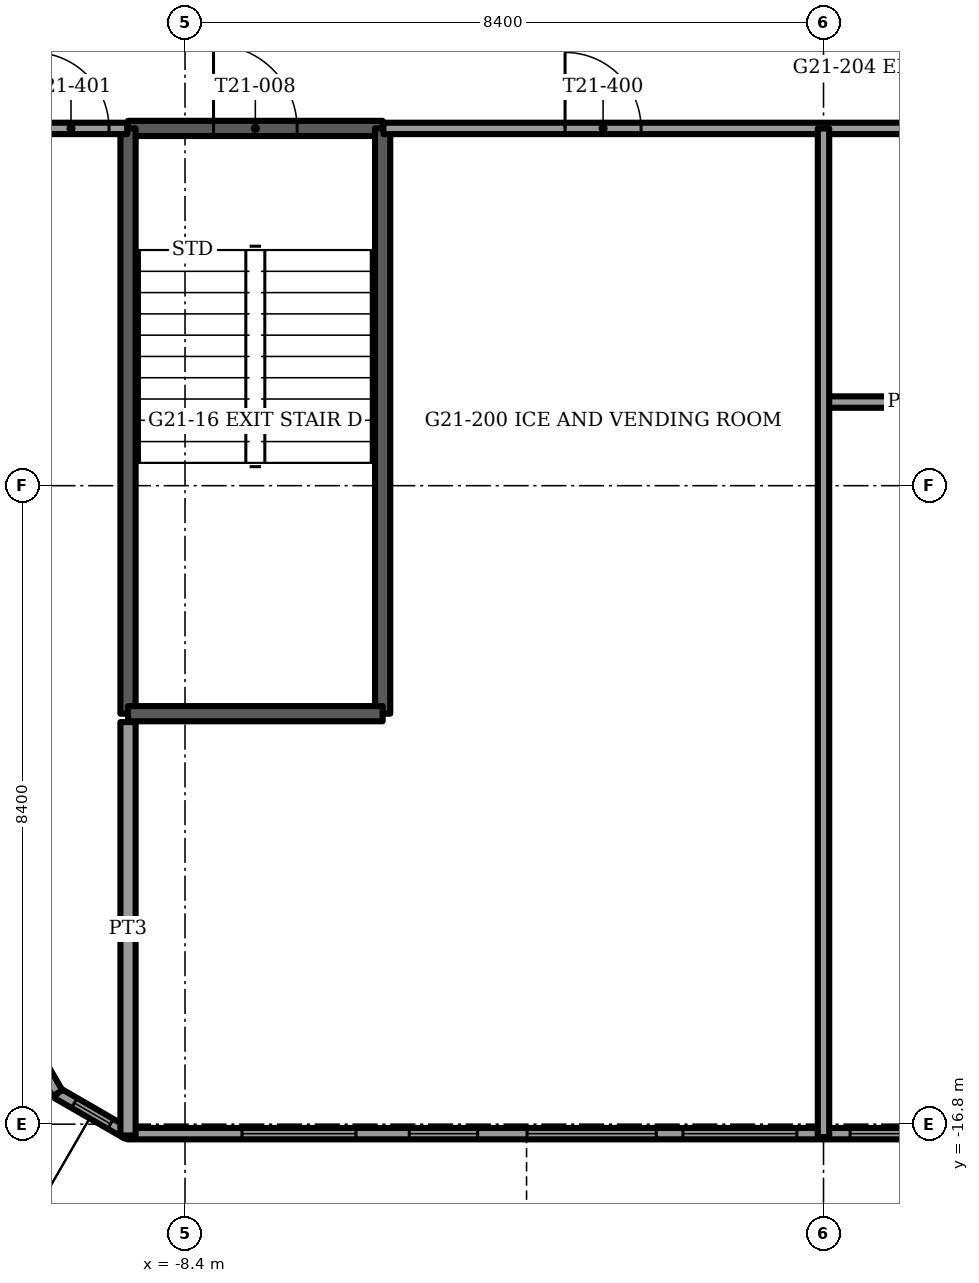
"""IFC4 building model, lengths in metres.
Left out: names, types, materials, properties, quantities, classifications, styles, units other than length and angle.
Written with IfcOpenShell. Run it as: python <this file> out.ifc"""

import sys

from ifc_helpers import new_model, si_unit, direction, frame, frame_2d, origin, place, context, subcontext, project, spatial, rectangle, extrude, element, fill, save


model = new_model("IFC4")
c1 = context("Model", 3, precision=1e-05, world=origin(), true_north=direction((0.0, 1.0)))
c2 = subcontext(c1, "Body", "Model", "MODEL_VIEW")
j1 = project(units=[si_unit("LENGTHUNIT", "METRE"), si_unit("PLANEANGLEUNIT", "RADIAN")], contexts=[c1])
p1 = place(None, origin())
s1 = spatial("IfcSite", under=j1, at=p1, CompositionType="ELEMENT")
p2 = place(p1, origin())
s2 = spatial("IfcBuilding", under=s1, at=p2, CompositionType="ELEMENT")
p3 = place(p2, frame((0.0, 0.0, 85.5)))
s3 = spatial("IfcBuildingStorey", under=s2, at=p3, CompositionType="ELEMENT", Elevation=85.5)
p4 = place(p3, frame((-19.236, -0.532, 0.0), z_axis=(0.0, 0.0, 1.0), x_axis=(0.499995945303, -0.866027744752, 0.0)))
e1 = element("IfcWall", 1, at=p4, inside=s3, PredefinedType="SOLIDWALL", context=c2, shape_type="SweptSolid", body=[
    extrude(rectangle(XDim=18.314, YDim=0.15, at=frame_2d((9.157, 0.0))), origin(), (0.0, 0.0, 1.0), 3.45),
])
p5 = place(p4, frame((4.784, 0.0, 0.15)))
e2 = element("IfcOpeningElement", 2, at=p5, cuts=e1, PredefinedType="OPENING", context=c2, shape_type="SweptSolid", body=[
    extrude(rectangle(XDim=1.5, YDim=2.85, at=frame_2d((0.75, 1.425))), frame((0.0, 0.075, 0.0), z_axis=(0.0, -1.0, 0.0), x_axis=(1.0, 0.0, 0.0)), (0.0, 0.0, 1.0), 0.15),
])
p6 = place(p4, frame((7.357, 0.0, 0.15)))
e3 = element("IfcOpeningElement", 3, at=p6, cuts=e1, PredefinedType="OPENING", context=c2, shape_type="SweptSolid", body=[
    extrude(rectangle(XDim=1.7, YDim=2.85, at=frame_2d((0.85, 1.425))), frame((0.0, 0.075, 0.0), z_axis=(0.0, -1.0, 0.0), x_axis=(1.0, 0.0, 0.0)), (0.0, 0.0, 1.0), 0.15),
])
p7 = place(p4, frame((9.457, 0.0, 0.0)))
e4 = element("IfcOpeningElement", 4, at=p7, cuts=e1, PredefinedType="OPENING", context=c2, shape_type="SweptSolid", body=[
    extrude(rectangle(XDim=1.5, YDim=2.4, at=frame_2d((0.75, 1.2))), frame((0.0, 0.075, 0.0), z_axis=(0.0, -1.0, 0.0), x_axis=(1.0, 0.0, 0.0)), (0.0, 0.0, 1.0), 0.15),
])
p8 = place(p4, frame((11.557, 0.0, 0.15)))
e5 = element("IfcOpeningElement", 5, at=p8, cuts=e1, PredefinedType="OPENING", context=c2, shape_type="SweptSolid", body=[
    extrude(rectangle(XDim=1.7, YDim=2.85, at=frame_2d((0.85, 1.425))), frame((0.0, 0.075, 0.0), z_axis=(0.0, -1.0, 0.0), x_axis=(1.0, 0.0, 0.0)), (0.0, 0.0, 1.0), 0.15),
])
p9 = place(p4, frame((13.657, 0.0, 0.0)))
e6 = element("IfcOpeningElement", 6, at=p9, cuts=e1, PredefinedType="OPENING", context=c2, shape_type="SweptSolid", body=[
    extrude(rectangle(XDim=1.5, YDim=2.4, at=frame_2d((0.75, 1.2))), frame((0.0, 0.075, 0.0), z_axis=(0.0, -1.0, 0.0), x_axis=(1.0, 0.0, 0.0)), (0.0, 0.0, 1.0), 0.15),
])
p10 = place(p4, frame((0.528, 0.0, 0.15)))
e7 = element("IfcOpeningElement", 7, at=p10, cuts=e1, PredefinedType="OPENING", context=c2, shape_type="SweptSolid", body=[
    extrude(rectangle(XDim=1.7, YDim=2.73, at=frame_2d((0.85, 1.365))), frame((0.0, 0.075, 0.0), z_axis=(0.0, -1.0, 0.0), x_axis=(1.0, 0.0, 0.0)), (0.0, 0.0, 1.0), 0.15),
])
p11 = place(p4, frame((16.085, 0.0, 0.15)))
e8 = element("IfcOpeningElement", 8, at=p11, cuts=e1, PredefinedType="OPENING", context=c2, shape_type="SweptSolid", body=[
    extrude(rectangle(XDim=1.7, YDim=2.73, at=frame_2d((0.85, 1.365))), frame((0.0, 0.075, 0.0), z_axis=(0.0, -1.0, 0.0), x_axis=(1.0, 0.0, 0.0)), (0.0, 0.0, 1.0), 0.15),
])
p12 = place(p3, frame((-9.157, -16.925, 0.0), z_axis=(0.0, 0.0, 1.0), x_axis=(1.0, 0.0, 0.0)))
e9 = element("IfcWall", 9, at=p12, inside=s3, PredefinedType="SOLIDWALL", context=c2, shape_type="SweptSolid", body=[
    extrude(rectangle(XDim=18.313, YDim=0.15, at=frame_2d((9.157, 0.0))), origin(), (0.0, 0.0, 1.0), 3.45),
])
p13 = place(p12, frame((3.707, 0.0, 0.15)))
e10 = element("IfcOpeningElement", 10, at=p13, cuts=e9, PredefinedType="OPENING", context=c2, shape_type="SweptSolid", body=[
    extrude(rectangle(XDim=0.9, YDim=2.85, at=frame_2d((0.45, 1.425))), frame((0.0, 0.075, 0.0), z_axis=(0.0, -1.0, 0.0), x_axis=(1.0, 0.0, 0.0)), (0.0, 0.0, 1.0), 0.15),
])
p14 = place(p12, frame((1.507, 0.0, 0.15)))
e11 = element("IfcOpeningElement", 11, at=p14, cuts=e9, PredefinedType="OPENING", context=c2, shape_type="SweptSolid", body=[
    extrude(rectangle(XDim=1.5, YDim=2.85, at=frame_2d((0.75, 1.425))), frame((0.0, 0.075, 0.0), z_axis=(0.0, -1.0, 0.0), x_axis=(1.0, 0.0, 0.0)), (0.0, 0.0, 1.0), 0.15),
])
p15 = place(p12, frame((5.257, 0.0, 0.15)))
e12 = element("IfcOpeningElement", 12, at=p15, cuts=e9, PredefinedType="OPENING", context=c2, shape_type="SweptSolid", body=[
    extrude(rectangle(XDim=1.7, YDim=2.85, at=frame_2d((0.85, 1.425))), frame((0.0, 0.075, 0.0), z_axis=(0.0, -1.0, 0.0), x_axis=(1.0, 0.0, 0.0)), (0.0, 0.0, 1.0), 0.15),
])
p16 = place(p12, frame((7.307, 0.0, 0.15)))
e13 = element("IfcOpeningElement", 13, at=p16, cuts=e9, PredefinedType="OPENING", context=c2, shape_type="SweptSolid", body=[
    extrude(rectangle(XDim=1.5, YDim=2.85, at=frame_2d((0.75, 1.425))), frame((0.0, 0.075, 0.0), z_axis=(0.0, -1.0, 0.0), x_axis=(1.0, 0.0, 0.0)), (0.0, 0.0, 1.0), 0.15),
])
p17 = place(p12, frame((9.507, 0.0, 0.15)))
e14 = element("IfcOpeningElement", 14, at=p17, cuts=e9, PredefinedType="OPENING", context=c2, shape_type="SweptSolid", body=[
    extrude(rectangle(XDim=1.7, YDim=2.85, at=frame_2d((0.85, 1.425))), frame((0.0, 0.075, 0.0), z_axis=(0.0, -1.0, 0.0), x_axis=(1.0, 0.0, 0.0)), (0.0, 0.0, 1.0), 0.15),
])
p18 = place(p12, frame((11.557, 0.0, 0.0)))
e15 = element("IfcOpeningElement", 15, at=p18, cuts=e9, PredefinedType="OPENING", context=c2, shape_type="SweptSolid", body=[
    extrude(rectangle(XDim=1.5, YDim=2.4, at=frame_2d((0.75, 1.2))), frame((0.0, 0.075, 0.0), z_axis=(0.0, -1.0, 0.0), x_axis=(1.0, 0.0, 0.0)), (0.0, 0.0, 1.0), 0.15),
])
p19 = place(p12, frame((15.307, 0.0, 0.15)))
e16 = element("IfcOpeningElement", 16, at=p19, cuts=e9, PredefinedType="OPENING", context=c2, shape_type="SweptSolid", body=[
    extrude(rectangle(XDim=1.7, YDim=2.85, at=frame_2d((0.85, 1.425))), frame((0.0, 0.075, 0.0), z_axis=(0.0, -1.0, 0.0), x_axis=(1.0, 0.0, 0.0)), (0.0, 0.0, 1.0), 0.15),
])
p20 = place(p3, frame((-10.079, -16.393, 0.0), z_axis=(0.0, 0.0, 1.0), x_axis=(0.866048165231, -0.499960573946, 0.0)))
e17 = element("IfcWall", 17, at=p20, inside=s3, PredefinedType="SOLIDWALL", context=c2, shape_type="SweptSolid", body=[
    extrude(rectangle(XDim=1.065, YDim=0.15, at=frame_2d((0.532, 0.0))), origin(), (0.0, 0.0, 1.0), 3.45),
])
p21 = place(p20, frame((0.258, 0.0, 0.15)))
e18 = element("IfcOpeningElement", 18, at=p21, cuts=e17, PredefinedType="OPENING", context=c2, shape_type="SweptSolid", body=[
    extrude(rectangle(XDim=0.55, YDim=2.85, at=frame_2d((0.275, 1.425))), frame((0.0, 0.075, 0.0), z_axis=(0.0, -1.0, 0.0), x_axis=(1.0, 0.0, 0.0)), (0.0, 0.0, 1.0), 0.15),
])
p22 = place(p3, frame((-9.15, -3.7, -0.3), z_axis=(0.0, 0.0, 1.0), x_axis=(1.0, 0.0, 0.0)))
e19 = element("IfcWall", 19, at=p22, inside=s3, PredefinedType="SOLIDWALL", context=c2, shape_type="SweptSolid", body=[
    extrude(rectangle(XDim=3.35, YDim=0.2, at=frame_2d((1.675, 0.0))), origin(), (0.0, 0.0, 1.0), 3.75),
])
p23 = place(p22, frame((1.125, 0.0, 0.0)))
e20 = element("IfcOpeningElement", 20, at=p23, cuts=e19, PredefinedType="OPENING", context=c2, shape_type="SweptSolid", body=[
    extrude(rectangle(XDim=1.1, YDim=2.1, at=frame_2d((0.55, 1.05))), frame((0.0, 0.1, 0.0), z_axis=(0.0, -1.0, 0.0), x_axis=(1.0, 0.0, 0.0)), (0.0, 0.0, 1.0), 0.2),
])
for number, where, z_axis, x_axis in (
    (21, (-9.15, -3.7, -0.3), (0.0, 0.0, 1.0), (0.0, -1.0, 0.0)),
    (22, (-5.8, -3.7, -0.3), (0.0, 0.0, 1.0), (0.0, -1.0, 0.0)),
):
    element("IfcWall", number, at=place(p3, frame(where, z_axis=z_axis, x_axis=x_axis)), inside=s3, PredefinedType="SOLIDWALL", context=c2, shape_type="SweptSolid", body=[
        extrude(rectangle(XDim=7.7, YDim=0.2, at=frame_2d((3.85, 0.0))), origin(), (0.0, 0.0, 1.0), 3.75),
    ])
p24 = place(p3, frame((-9.15, -11.4, -0.3), z_axis=(0.0, 0.0, 1.0), x_axis=(1.0, 0.0, 0.0)))
e23 = element("IfcWall", 23, at=p24, inside=s3, PredefinedType="SOLIDWALL", context=c2, shape_type="SweptSolid", body=[
    extrude(rectangle(XDim=3.35, YDim=0.2, at=frame_2d((1.675, 0.0))), origin(), (0.0, 0.0, 1.0), 3.75),
])
p25 = place(p3, frame((0.0, -7.3, 0.0), z_axis=(0.0, 0.0, 1.0), x_axis=(1.0, 0.0, 0.0)))
e24 = element("IfcWall", 24, at=p25, inside=s3, PredefinedType="PARTITIONING", context=c2, shape_type="SweptSolid", body=[
    extrude(rectangle(XDim=3.4, YDim=0.15, at=frame_2d((1.7, 0.0))), origin(), (0.0, 0.0, 1.0), 3.45),
])
p26 = place(p3, frame((-17.459, -3.7, 0.0), z_axis=(0.0, 0.0, 1.0), x_axis=(1.0, 0.0, 0.0)))
e25 = element("IfcWall", 25, at=p26, inside=s3, PredefinedType="PARTITIONING", context=c2, shape_type="SweptSolid", body=[
    extrude(rectangle(XDim=8.299, YDim=0.15, at=frame_2d((4.149, 0.0))), origin(), (0.0, 0.0, 1.0), 3.45),
])
p27 = place(p26, frame((7.059, 0.0, 0.0)))
e26 = element("IfcOpeningElement", 26, at=p27, cuts=e25, PredefinedType="OPENING", context=c2, shape_type="SweptSolid", body=[
    extrude(rectangle(XDim=1.0, YDim=2.1, at=frame_2d((0.5, 1.05))), frame((0.0, 0.075, 0.0), z_axis=(0.0, -1.0, 0.0), x_axis=(1.0, 0.0, 0.0)), (0.0, 0.0, 1.0), 0.15),
])
p28 = place(p3, frame((-5.79, -3.7, 0.0), z_axis=(0.0, 0.0, 1.0), x_axis=(1.0, 0.0, 0.0)))
e27 = element("IfcWall", 27, at=p28, inside=s3, PredefinedType="PARTITIONING", context=c2, shape_type="SweptSolid", body=[
    extrude(rectangle(XDim=11.58, YDim=0.15, at=frame_2d((5.79, 0.0))), origin(), (0.0, 0.0, 1.0), 3.45),
])
p29 = place(p28, frame((2.39, 0.0, 0.0)))
e28 = element("IfcOpeningElement", 28, at=p29, cuts=e27, PredefinedType="OPENING", context=c2, shape_type="SweptSolid", body=[
    extrude(rectangle(XDim=1.0, YDim=2.1, at=frame_2d((0.5, 1.05))), frame((0.0, 0.075, 0.0), z_axis=(0.0, -1.0, 0.0), x_axis=(1.0, 0.0, 0.0)), (0.0, 0.0, 1.0), 0.15),
])
p30 = place(p28, frame((10.34, 0.0, 0.0)))
e29 = element("IfcOpeningElement", 29, at=p30, cuts=e27, PredefinedType="OPENING", context=c2, shape_type="SweptSolid", body=[
    extrude(rectangle(XDim=1.0, YDim=2.1, at=frame_2d((0.5, 1.05))), frame((0.0, 0.075, 0.0), z_axis=(0.0, -1.0, 0.0), x_axis=(1.0, 0.0, 0.0)), (0.0, 0.0, 1.0), 0.15),
])
p31 = place(p3, frame((0.0, -16.97, 0.0), z_axis=(0.0, 0.0, 1.0), x_axis=(0.0, 1.0, 0.0)))
e30 = element("IfcWall", 30, at=p31, inside=s3, PredefinedType="PARTITIONING", context=c2, shape_type="SweptSolid", body=[
    extrude(rectangle(XDim=13.27, YDim=0.15, at=frame_2d((6.635, 0.0))), origin(), (0.0, 0.0, 1.0), 3.45),
])
p32 = place(p3, frame((-9.15, -16.949, 0.0), z_axis=(0.0, 0.0, 1.0), x_axis=(0.0, 1.0, 0.0)))
e31 = element("IfcWall", 31, at=p32, inside=s3, PredefinedType="PARTITIONING", context=c2, shape_type="SweptSolid", body=[
    extrude(rectangle(XDim=5.439, YDim=0.2, at=frame_2d((2.719, 0.0))), origin(), (0.0, 0.0, 1.0), 3.45),
])
p33 = place(p13, origin())
e32 = element("IfcWindow", 32, at=p33, inside=s3, PartitioningType="SINGLE_PANEL", PredefinedType="WINDOW", context=c2, shape_type="SweptSolid", body=[
    extrude(rectangle(XDim=0.9, YDim=2.85, at=frame_2d((0.45, 1.425))), frame((0.0, 0.03, 0.0), z_axis=(0.0, -1.0, 0.0), x_axis=(1.0, 0.0, 0.0)), (0.0, 0.0, 1.0), 0.06),
])
fill(e10, e32)
p34 = place(p14, origin())
e33 = element("IfcWindow", 33, at=p34, inside=s3, PartitioningType="SINGLE_PANEL", PredefinedType="WINDOW", context=c2, shape_type="SweptSolid", body=[
    extrude(rectangle(XDim=1.5, YDim=2.85, at=frame_2d((0.75, 1.425))), frame((0.0, 0.03, 0.0), z_axis=(0.0, -1.0, 0.0), x_axis=(1.0, 0.0, 0.0)), (0.0, 0.0, 1.0), 0.06),
])
fill(e11, e33)
p35 = place(p15, origin())
e34 = element("IfcWindow", 34, at=p35, inside=s3, PartitioningType="SINGLE_PANEL", PredefinedType="WINDOW", context=c2, shape_type="SweptSolid", body=[
    extrude(rectangle(XDim=1.7, YDim=2.85, at=frame_2d((0.85, 1.425))), frame((0.0, 0.03, 0.0), z_axis=(0.0, -1.0, 0.0), x_axis=(1.0, 0.0, 0.0)), (0.0, 0.0, 1.0), 0.06),
])
fill(e12, e34)
p36 = place(p16, origin())
e35 = element("IfcWindow", 35, at=p36, inside=s3, PartitioningType="SINGLE_PANEL", PredefinedType="WINDOW", context=c2, shape_type="SweptSolid", body=[
    extrude(rectangle(XDim=1.5, YDim=2.85, at=frame_2d((0.75, 1.425))), frame((0.0, 0.03, 0.0), z_axis=(0.0, -1.0, 0.0), x_axis=(1.0, 0.0, 0.0)), (0.0, 0.0, 1.0), 0.06),
])
fill(e13, e35)
p37 = place(p17, origin())
e36 = element("IfcWindow", 36, at=p37, inside=s3, PartitioningType="SINGLE_PANEL", PredefinedType="WINDOW", context=c2, shape_type="SweptSolid", body=[
    extrude(rectangle(XDim=1.7, YDim=2.85, at=frame_2d((0.85, 1.425))), frame((0.0, 0.03, 0.0), z_axis=(0.0, -1.0, 0.0), x_axis=(1.0, 0.0, 0.0)), (0.0, 0.0, 1.0), 0.06),
])
fill(e14, e36)
p38 = place(p21, origin())
e37 = element("IfcWindow", 37, at=p38, inside=s3, PartitioningType="SINGLE_PANEL", PredefinedType="WINDOW", context=c2, shape_type="SweptSolid", body=[
    extrude(rectangle(XDim=0.55, YDim=2.85, at=frame_2d((0.275, 1.425))), frame((0.0, 0.03, 0.0), z_axis=(0.0, -1.0, 0.0), x_axis=(1.0, 0.0, 0.0)), (0.0, 0.0, 1.0), 0.06),
])
fill(e18, e37)
p39 = place(p23, origin())
e38 = element("IfcDoor", 38, at=p39, inside=s3, OperationType="SINGLE_SWING_LEFT", PredefinedType="DOOR", context=c2, shape_type="SweptSolid", body=[
    extrude(rectangle(XDim=1.1, YDim=2.1, at=frame_2d((0.55, 1.05))), frame((0.0, 0.025, 0.0), z_axis=(0.0, -1.0, 0.0), x_axis=(1.0, 0.0, 0.0)), (0.0, 0.0, 1.0), 0.05),
])
fill(e20, e38)
p40 = place(p29, origin())
e39 = element("IfcDoor", 39, at=p40, inside=s3, OperationType="SINGLE_SWING_RIGHT", PredefinedType="DOOR", context=c2, shape_type="SweptSolid", body=[
    extrude(rectangle(XDim=1.0, YDim=2.1, at=frame_2d((0.5, 1.05))), frame((0.0, 0.025, 0.0), z_axis=(0.0, -1.0, 0.0), x_axis=(1.0, 0.0, 0.0)), (0.0, 0.0, 1.0), 0.05),
])
fill(e28, e39)
p41 = place(p27, origin())
e40 = element("IfcDoor", 40, at=p41, inside=s3, OperationType="SINGLE_SWING_RIGHT", PredefinedType="DOOR", context=c2, shape_type="SweptSolid", body=[
    extrude(rectangle(XDim=1.0, YDim=2.1, at=frame_2d((0.5, 1.05))), frame((0.0, 0.025, 0.0), z_axis=(0.0, -1.0, 0.0), x_axis=(1.0, 0.0, 0.0)), (0.0, 0.0, 1.0), 0.05),
])
fill(e26, e40)
save(model, sys.argv[1])
